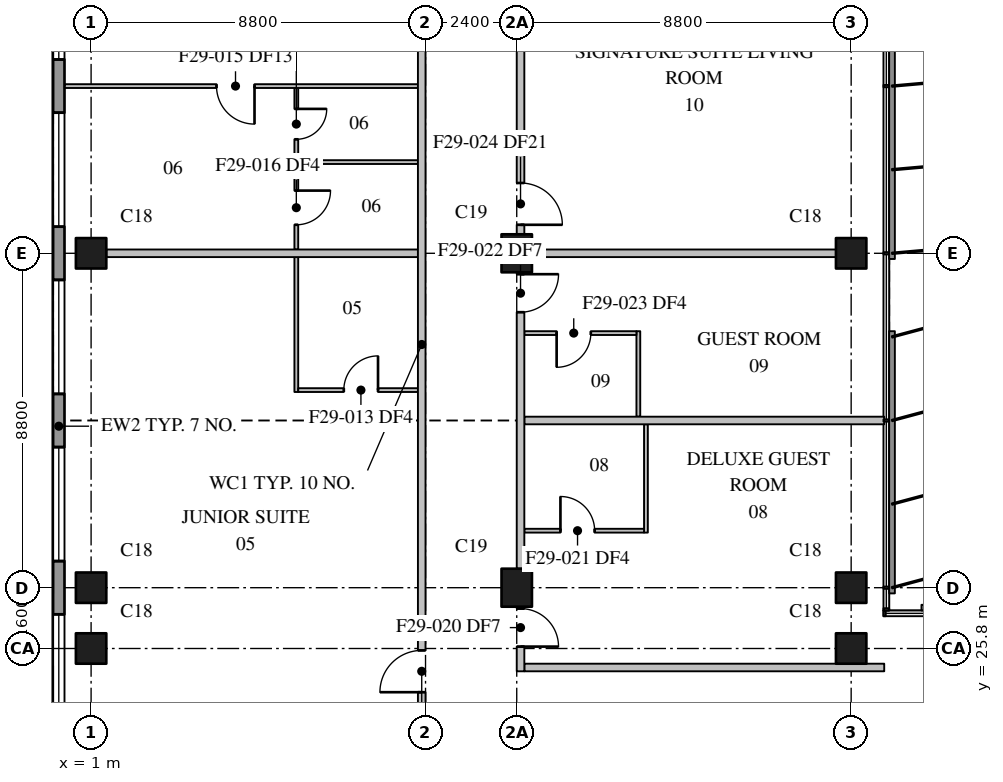
"""IFC4 building model, lengths in metres.
Left out: names, types, materials, properties, quantities, classifications, styles, units other than length and angle.
Written with IfcOpenShell. Run it as: python <this file> out.ifc"""

import sys

from ifc_helpers import new_model, si_unit, direction, frame, frame_2d, origin, origin_2d, place, context, subcontext, project, spatial, rectangle, extrude, element, fill, save


model = new_model("IFC4")
c1 = context("Model", 3, precision=1e-05, world=origin(), true_north=direction((0.0, 1.0)))
c2 = subcontext(c1, "Body", "Model", "MODEL_VIEW")
j1 = project(units=[si_unit("LENGTHUNIT", "METRE"), si_unit("PLANEANGLEUNIT", "RADIAN")], contexts=[c1])
p1 = place(None, origin())
s1 = spatial("IfcSite", under=j1, at=p1, CompositionType="ELEMENT")
p2 = place(p1, origin())
s2 = spatial("IfcBuilding", under=s1, at=p2, CompositionType="ELEMENT")
p3 = place(p2, frame((0.0, 0.0, 237.6)))
s3 = spatial("IfcBuildingStorey", under=s2, at=p3, CompositionType="ELEMENT", Elevation=237.6)
for number, where, z_axis, x_axis in (
    (1, (1.0, 25.8, 0.0), (0.0, 0.0, 1.0), (1.0, 0.0, 0.0)),
    (2, (1.0, 27.4, 0.0), (0.0, 0.0, 1.0), (1.0, 0.0, 0.0)),
    (3, (1.0, 36.2, 0.0), (0.0, 0.0, 1.0), (1.0, 0.0, 0.0)),
):
    element("IfcColumn", number, at=place(p3, frame(where, z_axis=z_axis, x_axis=x_axis)), inside=s3, PredefinedType="COLUMN", context=c2, shape_type="SweptSolid", body=[
        extrude(rectangle(XDim=0.8, YDim=0.8, at=origin_2d()), origin(), (0.0, 0.0, 1.0), 3.7),
    ])
for number, where, z_axis, x_axis in (
    (4, (12.2, 27.4, 0.0), (0.0, 0.0, 1.0), (0.0, 1.0, 0.0)),
    (5, (12.2, 36.2, 0.0), (0.0, 0.0, 1.0), (0.0, 1.0, 0.0)),
):
    element("IfcColumn", number, at=place(p3, frame(where, z_axis=z_axis, x_axis=x_axis)), inside=s3, PredefinedType="COLUMN", context=c2, shape_type="SweptSolid", body=[
        extrude(rectangle(XDim=1.0, YDim=0.8, at=origin_2d()), origin(), (0.0, 0.0, 1.0), 3.7),
    ])
for number, where, z_axis, x_axis in (
    (6, (21.0, 25.8, 0.0), (0.0, 0.0, 1.0), (1.0, 0.0, 0.0)),
    (7, (21.0, 27.4, 0.0), (0.0, 0.0, 1.0), (1.0, 0.0, 0.0)),
    (8, (21.0, 36.2, 0.0), (0.0, 0.0, 1.0), (1.0, 0.0, 0.0)),
):
    element("IfcColumn", number, at=place(p3, frame(where, z_axis=z_axis, x_axis=x_axis)), inside=s3, PredefinedType="COLUMN", context=c2, shape_type="SweptSolid", body=[
        extrude(rectangle(XDim=0.8, YDim=0.8, at=origin_2d()), origin(), (0.0, 0.0, 1.0), 3.7),
    ])
p4 = place(p3, frame((0.15, 61.1, 0.0), z_axis=(0.0, 0.0, 1.0), x_axis=(0.0, -1.0, 0.0)))
e9 = element("IfcWall", 9, at=p4, inside=s3, PredefinedType="STANDARD", context=c2, shape_type="SweptSolid", body=[
    extrude(rectangle(XDim=58.9, YDim=0.3, at=frame_2d((29.45, 0.0))), origin(), (0.0, 0.0, 1.0), 3.4),
])
p5 = place(p4, frame((3.6, 0.0, 0.75)))
e10 = element("IfcOpeningElement", 10, at=p5, cuts=e9, PredefinedType="OPENING", context=c2, shape_type="SweptSolid", body=[
    extrude(rectangle(XDim=3.0, YDim=2.3, at=frame_2d((1.5, 1.15))), frame((0.0, 0.16, 0.0), z_axis=(0.0, -1.0, 0.0), x_axis=(1.0, 0.0, 0.0)), (0.0, 0.0, 1.0), 0.32),
])
p6 = place(p4, frame((8.0, 0.0, 0.75)))
e11 = element("IfcOpeningElement", 11, at=p6, cuts=e9, PredefinedType="OPENING", context=c2, shape_type="SweptSolid", body=[
    extrude(rectangle(XDim=3.0, YDim=2.3, at=frame_2d((1.5, 1.15))), frame((0.0, 0.16, 0.0), z_axis=(0.0, -1.0, 0.0), x_axis=(1.0, 0.0, 0.0)), (0.0, 0.0, 1.0), 0.32),
])
p7 = place(p4, frame((12.4, 0.0, 0.75)))
e12 = element("IfcOpeningElement", 12, at=p7, cuts=e9, PredefinedType="OPENING", context=c2, shape_type="SweptSolid", body=[
    extrude(rectangle(XDim=3.0, YDim=2.3, at=frame_2d((1.5, 1.15))), frame((0.0, 0.16, 0.0), z_axis=(0.0, -1.0, 0.0), x_axis=(1.0, 0.0, 0.0)), (0.0, 0.0, 1.0), 0.32),
])
p8 = place(p4, frame((16.8, 0.0, 0.75)))
e13 = element("IfcOpeningElement", 13, at=p8, cuts=e9, PredefinedType="OPENING", context=c2, shape_type="SweptSolid", body=[
    extrude(rectangle(XDim=3.0, YDim=2.3, at=frame_2d((1.5, 1.15))), frame((0.0, 0.16, 0.0), z_axis=(0.0, -1.0, 0.0), x_axis=(1.0, 0.0, 0.0)), (0.0, 0.0, 1.0), 0.32),
])
p9 = place(p4, frame((21.2, 0.0, 0.75)))
e14 = element("IfcOpeningElement", 14, at=p9, cuts=e9, PredefinedType="OPENING", context=c2, shape_type="SweptSolid", body=[
    extrude(rectangle(XDim=3.0, YDim=2.3, at=frame_2d((1.5, 1.15))), frame((0.0, 0.16, 0.0), z_axis=(0.0, -1.0, 0.0), x_axis=(1.0, 0.0, 0.0)), (0.0, 0.0, 1.0), 0.32),
])
p10 = place(p4, frame((25.6, 0.0, 0.75)))
e15 = element("IfcOpeningElement", 15, at=p10, cuts=e9, PredefinedType="OPENING", context=c2, shape_type="SweptSolid", body=[
    extrude(rectangle(XDim=3.0, YDim=2.3, at=frame_2d((1.5, 1.15))), frame((0.0, 0.16, 0.0), z_axis=(0.0, -1.0, 0.0), x_axis=(1.0, 0.0, 0.0)), (0.0, 0.0, 1.0), 0.32),
])
p11 = place(p4, frame((30.0, 0.0, 0.75)))
e16 = element("IfcOpeningElement", 16, at=p11, cuts=e9, PredefinedType="OPENING", context=c2, shape_type="SweptSolid", body=[
    extrude(rectangle(XDim=3.0, YDim=2.3, at=frame_2d((1.5, 1.15))), frame((0.0, 0.16, 0.0), z_axis=(0.0, -1.0, 0.0), x_axis=(1.0, 0.0, 0.0)), (0.0, 0.0, 1.0), 0.32),
])
p12 = place(p4, frame((34.4, 0.0, 0.75)))
e17 = element("IfcOpeningElement", 17, at=p12, cuts=e9, PredefinedType="OPENING", context=c2, shape_type="SweptSolid", body=[
    extrude(rectangle(XDim=3.0, YDim=2.3, at=frame_2d((1.5, 1.15))), frame((0.0, 0.16, 0.0), z_axis=(0.0, -1.0, 0.0), x_axis=(1.0, 0.0, 0.0)), (0.0, 0.0, 1.0), 0.32),
])
p13 = place(p4, frame((38.8, 0.0, 0.75)))
e18 = element("IfcOpeningElement", 18, at=p13, cuts=e9, PredefinedType="OPENING", context=c2, shape_type="SweptSolid", body=[
    extrude(rectangle(XDim=3.0, YDim=2.3, at=frame_2d((1.5, 1.15))), frame((0.0, 0.16, 0.0), z_axis=(0.0, -1.0, 0.0), x_axis=(1.0, 0.0, 0.0)), (0.0, 0.0, 1.0), 0.32),
])
p14 = place(p4, frame((43.2, 0.0, 0.75)))
e19 = element("IfcOpeningElement", 19, at=p14, cuts=e9, PredefinedType="OPENING", context=c2, shape_type="SweptSolid", body=[
    extrude(rectangle(XDim=3.0, YDim=2.3, at=frame_2d((1.5, 1.15))), frame((0.0, 0.16, 0.0), z_axis=(0.0, -1.0, 0.0), x_axis=(1.0, 0.0, 0.0)), (0.0, 0.0, 1.0), 0.32),
])
p15 = place(p4, frame((47.6, 0.0, 0.75)))
e20 = element("IfcOpeningElement", 20, at=p15, cuts=e9, PredefinedType="OPENING", context=c2, shape_type="SweptSolid", body=[
    extrude(rectangle(XDim=3.0, YDim=2.3, at=frame_2d((1.5, 1.15))), frame((0.0, 0.16, 0.0), z_axis=(0.0, -1.0, 0.0), x_axis=(1.0, 0.0, 0.0)), (0.0, 0.0, 1.0), 0.32),
])
p16 = place(p4, frame((52.0, 0.0, 0.75)))
e21 = element("IfcOpeningElement", 21, at=p16, cuts=e9, PredefinedType="OPENING", context=c2, shape_type="SweptSolid", body=[
    extrude(rectangle(XDim=3.0, YDim=2.3, at=frame_2d((1.5, 1.15))), frame((0.0, 0.16, 0.0), z_axis=(0.0, -1.0, 0.0), x_axis=(1.0, 0.0, 0.0)), (0.0, 0.0, 1.0), 0.32),
])
p17 = place(p3, frame((9.7, 9.8, 0.0), z_axis=(0.0, 0.0, 1.0), x_axis=(0.0, 1.0, 0.0)))
e22 = element("IfcWall", 22, at=p17, inside=s3, PredefinedType="PARTITIONING", context=c2, shape_type="SweptSolid", body=[
    extrude(rectangle(XDim=48.0, YDim=0.2, at=frame_2d((24.0, 0.0))), origin(), (0.0, 0.0, 1.0), 3.4),
])
p18 = place(p17, frame((6.95, 0.0, 0.0)))
e23 = element("IfcOpeningElement", 23, at=p18, cuts=e22, PredefinedType="OPENING", context=c2, shape_type="SweptSolid", body=[
    extrude(rectangle(XDim=1.1, YDim=2.1, at=frame_2d((0.55, 1.05))), frame((0.0, 0.11, 0.0), z_axis=(0.0, -1.0, 0.0), x_axis=(1.0, 0.0, 0.0)), (0.0, 0.0, 1.0), 0.22),
])
p19 = place(p17, frame((14.85, 0.0, 0.0)))
e24 = element("IfcOpeningElement", 24, at=p19, cuts=e22, PredefinedType="OPENING", context=c2, shape_type="SweptSolid", body=[
    extrude(rectangle(XDim=1.1, YDim=2.1, at=frame_2d((0.55, 1.05))), frame((0.0, 0.11, 0.0), z_axis=(0.0, -1.0, 0.0), x_axis=(1.0, 0.0, 0.0)), (0.0, 0.0, 1.0), 0.22),
])
p20 = place(p17, frame((37.75, 0.0, 0.0)))
e25 = element("IfcOpeningElement", 25, at=p20, cuts=e22, PredefinedType="OPENING", context=c2, shape_type="SweptSolid", body=[
    extrude(rectangle(XDim=1.1, YDim=2.1, at=frame_2d((0.55, 1.05))), frame((0.0, 0.11, 0.0), z_axis=(0.0, -1.0, 0.0), x_axis=(1.0, 0.0, 0.0)), (0.0, 0.0, 1.0), 0.22),
])
p21 = place(p17, frame((41.05, 0.0, 0.0)))
e26 = element("IfcOpeningElement", 26, at=p21, cuts=e22, PredefinedType="OPENING", context=c2, shape_type="SweptSolid", body=[
    extrude(rectangle(XDim=1.1, YDim=2.1, at=frame_2d((0.55, 1.05))), frame((0.0, 0.11, 0.0), z_axis=(0.0, -1.0, 0.0), x_axis=(1.0, 0.0, 0.0)), (0.0, 0.0, 1.0), 0.22),
])
p22 = place(p3, frame((1.4, 36.2, 0.0), z_axis=(0.0, 0.0, 1.0), x_axis=(1.0, 0.0, 0.0)))
e27 = element("IfcWall", 27, at=p22, inside=s3, PredefinedType="PARTITIONING", context=c2, shape_type="SweptSolid", body=[
    extrude(rectangle(XDim=8.2, YDim=0.2, at=frame_2d((4.1, 0.0))), origin(), (0.0, 0.0, 1.0), 3.4),
])
p23 = place(p3, frame((12.6, 36.2, 0.0), z_axis=(0.0, 0.0, 1.0), x_axis=(1.0, 0.0, 0.0)))
e28 = element("IfcWall", 28, at=p23, inside=s3, PredefinedType="PARTITIONING", context=c2, shape_type="SweptSolid", body=[
    extrude(rectangle(XDim=8.0, YDim=0.2, at=frame_2d((4.0, 0.0))), origin(), (0.0, 0.0, 1.0), 3.4),
])
p24 = place(p3, frame((12.3, 26.9, 0.0), z_axis=(0.0, 0.0, 1.0), x_axis=(0.0, -1.0, 0.0)))
e29 = element("IfcWall", 29, at=p24, inside=s3, PredefinedType="PARTITIONING", context=c2, shape_type="SweptSolid", body=[
    extrude(rectangle(XDim=1.7, YDim=0.2, at=frame_2d((0.85, 0.0))), origin(), (0.0, 0.0, 1.0), 3.4),
])
p25 = place(p24, frame((0.05, 0.0, 0.0)))
e30 = element("IfcOpeningElement", 30, at=p25, cuts=e29, PredefinedType="OPENING", context=c2, shape_type="SweptSolid", body=[
    extrude(rectangle(XDim=1.0, YDim=2.1, at=frame_2d((0.5, 1.05))), frame((0.0, 0.11, 0.0), z_axis=(0.0, -1.0, 0.0), x_axis=(1.0, 0.0, 0.0)), (0.0, 0.0, 1.0), 0.22),
])
p26 = place(p3, frame((12.3, 35.7, 0.0), z_axis=(0.0, 0.0, 1.0), x_axis=(0.0, -1.0, 0.0)))
e31 = element("IfcWall", 31, at=p26, inside=s3, PredefinedType="PARTITIONING", context=c2, shape_type="SweptSolid", body=[
    extrude(rectangle(XDim=7.8, YDim=0.2, at=frame_2d((3.9, 0.0))), origin(), (0.0, 0.0, 1.0), 3.4),
])
p27 = place(p26, frame((0.05, 0.0, 0.0)))
e32 = element("IfcOpeningElement", 32, at=p27, cuts=e31, PredefinedType="OPENING", context=c2, shape_type="SweptSolid", body=[
    extrude(rectangle(XDim=1.0, YDim=2.1, at=frame_2d((0.5, 1.05))), frame((0.0, 0.11, 0.0), z_axis=(0.0, -1.0, 0.0), x_axis=(1.0, 0.0, 0.0)), (0.0, 0.0, 1.0), 0.22),
])
p28 = place(p3, frame((12.3, 44.5, 0.0), z_axis=(0.0, 0.0, 1.0), x_axis=(0.0, -1.0, 0.0)))
e33 = element("IfcWall", 33, at=p28, inside=s3, PredefinedType="PARTITIONING", context=c2, shape_type="SweptSolid", body=[
    extrude(rectangle(XDim=7.8, YDim=0.2, at=frame_2d((3.9, 0.0))), origin(), (0.0, 0.0, 1.0), 3.4),
])
p29 = place(p28, frame((6.45, 0.0, 0.0)))
e34 = element("IfcOpeningElement", 34, at=p29, cuts=e33, PredefinedType="OPENING", context=c2, shape_type="SweptSolid", body=[
    extrude(rectangle(XDim=1.1, YDim=2.1, at=frame_2d((0.55, 1.05))), frame((0.0, 0.11, 0.0), z_axis=(0.0, -1.0, 0.0), x_axis=(1.0, 0.0, 0.0)), (0.0, 0.0, 1.0), 0.22),
])
for number, where, z_axis, x_axis in (
    (35, (12.4, 25.3, 0.0), (0.0, 0.0, 1.0), (1.0, 0.0, 0.0)),
    (36, (12.4, 31.8, 0.0), (0.0, 0.0, 1.0), (1.0, 0.0, 0.0)),
):
    element("IfcWall", number, at=place(p3, frame(where, z_axis=z_axis, x_axis=x_axis)), inside=s3, PredefinedType="PARTITIONING", context=c2, shape_type="SweptSolid", body=[
        extrude(rectangle(XDim=9.47, YDim=0.2, at=frame_2d((4.735, 0.0))), origin(), (0.0, 0.0, 1.0), 3.4),
    ])
p30 = place(p3, frame((6.4, 32.55, 0.0), z_axis=(0.0, 0.0, 1.0), x_axis=(0.0, 1.0, 0.0)))
e37 = element("IfcWall", 37, at=p30, inside=s3, PredefinedType="PARTITIONING", context=c2, shape_type="SweptSolid", body=[
    extrude(rectangle(XDim=3.55, YDim=0.1, at=frame_2d((1.775, 0.0))), origin(), (0.0, 0.0, 1.0), 3.4),
])
p31 = place(p3, frame((6.4, 40.55, 0.0), z_axis=(0.0, 0.0, 1.0), x_axis=(0.0, -1.0, 0.0)))
e38 = element("IfcWall", 38, at=p31, inside=s3, PredefinedType="PARTITIONING", context=c2, shape_type="SweptSolid", body=[
    extrude(rectangle(XDim=4.25, YDim=0.1, at=frame_2d((2.125, 0.0))), origin(), (0.0, 0.0, 1.0), 3.4),
])
p32 = place(p31, frame((2.7, 0.0, 0.0)))
e39 = element("IfcOpeningElement", 39, at=p32, cuts=e38, PredefinedType="OPENING", context=c2, shape_type="SweptSolid", body=[
    extrude(rectangle(XDim=0.9, YDim=2.1, at=frame_2d((0.45, 1.05))), frame((0.0, 0.06, 0.0), z_axis=(0.0, -1.0, 0.0), x_axis=(1.0, 0.0, 0.0)), (0.0, 0.0, 1.0), 0.12),
])
p33 = place(p31, frame((0.55, 0.0, 0.0)))
e40 = element("IfcOpeningElement", 40, at=p33, cuts=e38, PredefinedType="OPENING", context=c2, shape_type="SweptSolid", body=[
    extrude(rectangle(XDim=0.8, YDim=2.1, at=frame_2d((0.4, 1.05))), frame((0.0, 0.06, 0.0), z_axis=(0.0, -1.0, 0.0), x_axis=(1.0, 0.0, 0.0)), (0.0, 0.0, 1.0), 0.12),
])
p34 = place(p3, frame((6.45, 32.6, 0.0), z_axis=(0.0, 0.0, 1.0), x_axis=(1.0, 0.0, 0.0)))
e41 = element("IfcWall", 41, at=p34, inside=s3, PredefinedType="PARTITIONING", context=c2, shape_type="SweptSolid", body=[
    extrude(rectangle(XDim=3.15, YDim=0.1, at=frame_2d((1.575, 0.0))), origin(), (0.0, 0.0, 1.0), 3.4),
])
p35 = place(p34, frame((1.2, 0.0, 0.0)))
e42 = element("IfcOpeningElement", 42, at=p35, cuts=e41, PredefinedType="OPENING", context=c2, shape_type="SweptSolid", body=[
    extrude(rectangle(XDim=0.9, YDim=2.1, at=frame_2d((0.45, 1.05))), frame((0.0, 0.06, 0.0), z_axis=(0.0, -1.0, 0.0), x_axis=(1.0, 0.0, 0.0)), (0.0, 0.0, 1.0), 0.12),
])
p36 = place(p3, frame((9.6, 40.6, 0.0), z_axis=(0.0, 0.0, 1.0), x_axis=(-1.0, 0.0, 0.0)))
e43 = element("IfcWall", 43, at=p36, inside=s3, PredefinedType="PARTITIONING", context=c2, shape_type="SweptSolid", body=[
    extrude(rectangle(XDim=9.29, YDim=0.1, at=frame_2d((4.645, 0.0))), origin(), (0.0, 0.0, 1.0), 3.4),
])
p37 = place(p36, frame((4.3, 0.0, 0.0)))
e44 = element("IfcOpeningElement", 44, at=p37, cuts=e43, PredefinedType="OPENING", context=c2, shape_type="SweptSolid", body=[
    extrude(rectangle(XDim=1.0, YDim=2.1, at=frame_2d((0.5, 1.05))), frame((0.0, 0.06, 0.0), z_axis=(0.0, -1.0, 0.0), x_axis=(1.0, 0.0, 0.0)), (0.0, 0.0, 1.0), 0.12),
])
p38 = place(p3, frame((6.45, 38.6, 0.0), z_axis=(0.0, 0.0, 1.0), x_axis=(1.0, 0.0, 0.0)))
e45 = element("IfcWall", 45, at=p38, inside=s3, PredefinedType="PARTITIONING", context=c2, shape_type="SweptSolid", body=[
    extrude(rectangle(XDim=3.15, YDim=0.1, at=frame_2d((1.575, 0.0))), origin(), (0.0, 0.0, 1.0), 3.4),
])
p39 = place(p3, frame((15.6, 28.85, 0.0), z_axis=(0.0, 0.0, 1.0), x_axis=(0.0, 1.0, 0.0)))
e46 = element("IfcWall", 46, at=p39, inside=s3, PredefinedType="PARTITIONING", context=c2, shape_type="SweptSolid", body=[
    extrude(rectangle(XDim=2.85, YDim=0.1, at=frame_2d((1.425, 0.0))), origin(), (0.0, 0.0, 1.0), 3.4),
])
p40 = place(p3, frame((12.4, 28.9, 0.0), z_axis=(0.0, 0.0, 1.0), x_axis=(1.0, 0.0, 0.0)))
e47 = element("IfcWall", 47, at=p40, inside=s3, PredefinedType="PARTITIONING", context=c2, shape_type="SweptSolid", body=[
    extrude(rectangle(XDim=3.15, YDim=0.1, at=frame_2d((1.575, 0.0))), origin(), (0.0, 0.0, 1.0), 3.4),
])
p41 = place(p40, frame((0.95, 0.0, 0.0)))
e48 = element("IfcOpeningElement", 48, at=p41, cuts=e47, PredefinedType="OPENING", context=c2, shape_type="SweptSolid", body=[
    extrude(rectangle(XDim=0.9, YDim=2.1, at=frame_2d((0.45, 1.05))), frame((0.0, 0.06, 0.0), z_axis=(0.0, -1.0, 0.0), x_axis=(1.0, 0.0, 0.0)), (0.0, 0.0, 1.0), 0.12),
])
p42 = place(p3, frame((15.4, 31.9, 0.0), z_axis=(0.0, 0.0, 1.0), x_axis=(0.0, 1.0, 0.0)))
e49 = element("IfcWall", 49, at=p42, inside=s3, PredefinedType="PARTITIONING", context=c2, shape_type="SweptSolid", body=[
    extrude(rectangle(XDim=2.25, YDim=0.1, at=frame_2d((1.125, 0.0))), origin(), (0.0, 0.0, 1.0), 3.4),
])
p43 = place(p3, frame((15.35, 34.1, 0.0), z_axis=(0.0, 0.0, 1.0), x_axis=(-1.0, 0.0, 0.0)))
e50 = element("IfcWall", 50, at=p43, inside=s3, PredefinedType="PARTITIONING", context=c2, shape_type="SweptSolid", body=[
    extrude(rectangle(XDim=2.95, YDim=0.1, at=frame_2d((1.475, 0.0))), origin(), (0.0, 0.0, 1.0), 3.4),
])
p44 = place(p43, frame((1.2, 0.0, 0.0)))
e51 = element("IfcOpeningElement", 51, at=p44, cuts=e50, PredefinedType="OPENING", context=c2, shape_type="SweptSolid", body=[
    extrude(rectangle(XDim=0.9, YDim=2.1, at=frame_2d((0.45, 1.05))), frame((0.0, 0.06, 0.0), z_axis=(0.0, -1.0, 0.0), x_axis=(1.0, 0.0, 0.0)), (0.0, 0.0, 1.0), 0.12),
])
p45 = place(p8, origin())
e52 = element("IfcWindow", 52, at=p45, inside=s3, PartitioningType="SINGLE_PANEL", PredefinedType="WINDOW", context=c2, shape_type="SweptSolid", body=[
    extrude(rectangle(XDim=3.0, YDim=2.3, at=frame_2d((1.5, 1.15))), frame((0.0, 0.03, 0.0), z_axis=(0.0, -1.0, 0.0), x_axis=(1.0, 0.0, 0.0)), (0.0, 0.0, 1.0), 0.06),
])
fill(e13, e52)
p46 = place(p9, origin())
e53 = element("IfcWindow", 53, at=p46, inside=s3, PartitioningType="SINGLE_PANEL", PredefinedType="WINDOW", context=c2, shape_type="SweptSolid", body=[
    extrude(rectangle(XDim=3.0, YDim=2.3, at=frame_2d((1.5, 1.15))), frame((0.0, 0.03, 0.0), z_axis=(0.0, -1.0, 0.0), x_axis=(1.0, 0.0, 0.0)), (0.0, 0.0, 1.0), 0.06),
])
fill(e14, e53)
p47 = place(p10, origin())
e54 = element("IfcWindow", 54, at=p47, inside=s3, PartitioningType="SINGLE_PANEL", PredefinedType="WINDOW", context=c2, shape_type="SweptSolid", body=[
    extrude(rectangle(XDim=3.0, YDim=2.3, at=frame_2d((1.5, 1.15))), frame((0.0, 0.03, 0.0), z_axis=(0.0, -1.0, 0.0), x_axis=(1.0, 0.0, 0.0)), (0.0, 0.0, 1.0), 0.06),
])
fill(e15, e54)
p48 = place(p11, origin())
e55 = element("IfcWindow", 55, at=p48, inside=s3, PartitioningType="SINGLE_PANEL", PredefinedType="WINDOW", context=c2, shape_type="SweptSolid", body=[
    extrude(rectangle(XDim=3.0, YDim=2.3, at=frame_2d((1.5, 1.15))), frame((0.0, 0.03, 0.0), z_axis=(0.0, -1.0, 0.0), x_axis=(1.0, 0.0, 0.0)), (0.0, 0.0, 1.0), 0.06),
])
fill(e16, e55)
p49 = place(p12, origin())
e56 = element("IfcWindow", 56, at=p49, inside=s3, PartitioningType="SINGLE_PANEL", PredefinedType="WINDOW", context=c2, shape_type="SweptSolid", body=[
    extrude(rectangle(XDim=3.0, YDim=2.3, at=frame_2d((1.5, 1.15))), frame((0.0, 0.03, 0.0), z_axis=(0.0, -1.0, 0.0), x_axis=(1.0, 0.0, 0.0)), (0.0, 0.0, 1.0), 0.06),
])
fill(e17, e56)
p50 = place(p19, origin())
e57 = element("IfcDoor", 57, at=p50, inside=s3, OperationType="SINGLE_SWING_LEFT", PredefinedType="DOOR", context=c2, shape_type="SweptSolid", body=[
    extrude(rectangle(XDim=1.1, YDim=2.1, at=frame_2d((0.55, 1.05))), frame((0.0, 0.025, 0.0), z_axis=(0.0, -1.0, 0.0), x_axis=(1.0, 0.0, 0.0)), (0.0, 0.0, 1.0), 0.05),
])
fill(e24, e57)
p51 = place(p35, origin())
e58 = element("IfcDoor", 58, at=p51, inside=s3, OperationType="SINGLE_SWING_RIGHT", PredefinedType="DOOR", context=c2, shape_type="SweptSolid", body=[
    extrude(rectangle(XDim=0.9, YDim=2.1, at=frame_2d((0.45, 1.05))), frame((0.0, 0.025, 0.0), z_axis=(0.0, -1.0, 0.0), x_axis=(1.0, 0.0, 0.0)), (0.0, 0.0, 1.0), 0.05),
])
fill(e42, e58)
p52 = place(p37, origin())
e59 = element("IfcDoor", 59, at=p52, inside=s3, OperationType="SINGLE_SWING_LEFT", PredefinedType="DOOR", context=c2, shape_type="SweptSolid", body=[
    extrude(rectangle(XDim=1.0, YDim=2.1, at=frame_2d((0.5, 1.05))), frame((0.0, 0.025, 0.0), z_axis=(0.0, -1.0, 0.0), x_axis=(1.0, 0.0, 0.0)), (0.0, 0.0, 1.0), 0.05),
])
fill(e44, e59)
p53 = place(p32, origin())
e60 = element("IfcDoor", 60, at=p53, inside=s3, OperationType="SINGLE_SWING_LEFT", PredefinedType="DOOR", context=c2, shape_type="SweptSolid", body=[
    extrude(rectangle(XDim=0.9, YDim=2.1, at=frame_2d((0.45, 1.05))), frame((0.0, 0.025, 0.0), z_axis=(0.0, -1.0, 0.0), x_axis=(1.0, 0.0, 0.0)), (0.0, 0.0, 1.0), 0.05),
])
fill(e39, e60)
p54 = place(p33, origin())
e61 = element("IfcDoor", 61, at=p54, inside=s3, OperationType="SINGLE_SWING_LEFT", PredefinedType="DOOR", context=c2, shape_type="SweptSolid", body=[
    extrude(rectangle(XDim=0.8, YDim=2.1, at=frame_2d((0.4, 1.05))), frame((0.0, 0.025, 0.0), z_axis=(0.0, -1.0, 0.0), x_axis=(1.0, 0.0, 0.0)), (0.0, 0.0, 1.0), 0.05),
])
fill(e40, e61)
p55 = place(p25, origin())
e62 = element("IfcDoor", 62, at=p55, inside=s3, OperationType="SINGLE_SWING_RIGHT", PredefinedType="DOOR", context=c2, shape_type="SweptSolid", body=[
    extrude(rectangle(XDim=1.0, YDim=2.1, at=frame_2d((0.5, 1.05))), frame((0.0, 0.025, 0.0), z_axis=(0.0, -1.0, 0.0), x_axis=(1.0, 0.0, 0.0)), (0.0, 0.0, 1.0), 0.05),
])
fill(e30, e62)
p56 = place(p41, origin())
e63 = element("IfcDoor", 63, at=p56, inside=s3, OperationType="SINGLE_SWING_LEFT", PredefinedType="DOOR", context=c2, shape_type="SweptSolid", body=[
    extrude(rectangle(XDim=0.9, YDim=2.1, at=frame_2d((0.45, 1.05))), frame((0.0, 0.025, 0.0), z_axis=(0.0, -1.0, 0.0), x_axis=(1.0, 0.0, 0.0)), (0.0, 0.0, 1.0), 0.05),
])
fill(e48, e63)
p57 = place(p27, origin())
e64 = element("IfcDoor", 64, at=p57, inside=s3, OperationType="SINGLE_SWING_LEFT", PredefinedType="DOOR", context=c2, shape_type="SweptSolid", body=[
    extrude(rectangle(XDim=1.0, YDim=2.1, at=frame_2d((0.5, 1.05))), frame((0.0, 0.025, 0.0), z_axis=(0.0, -1.0, 0.0), x_axis=(1.0, 0.0, 0.0)), (0.0, 0.0, 1.0), 0.05),
])
fill(e32, e64)
p58 = place(p44, origin())
e65 = element("IfcDoor", 65, at=p58, inside=s3, OperationType="SINGLE_SWING_RIGHT", PredefinedType="DOOR", context=c2, shape_type="SweptSolid", body=[
    extrude(rectangle(XDim=0.9, YDim=2.1, at=frame_2d((0.45, 1.05))), frame((0.0, 0.025, 0.0), z_axis=(0.0, -1.0, 0.0), x_axis=(1.0, 0.0, 0.0)), (0.0, 0.0, 1.0), 0.05),
])
fill(e51, e65)
p59 = place(p29, origin())
e66 = element("IfcDoor", 66, at=p59, inside=s3, OperationType="SINGLE_SWING_RIGHT", PredefinedType="DOOR", context=c2, shape_type="SweptSolid", body=[
    extrude(rectangle(XDim=1.1, YDim=2.1, at=frame_2d((0.55, 1.05))), frame((0.0, 0.025, 0.0), z_axis=(0.0, -1.0, 0.0), x_axis=(1.0, 0.0, 0.0)), (0.0, 0.0, 1.0), 0.05),
])
fill(e34, e66)
save(model, sys.argv[1])
